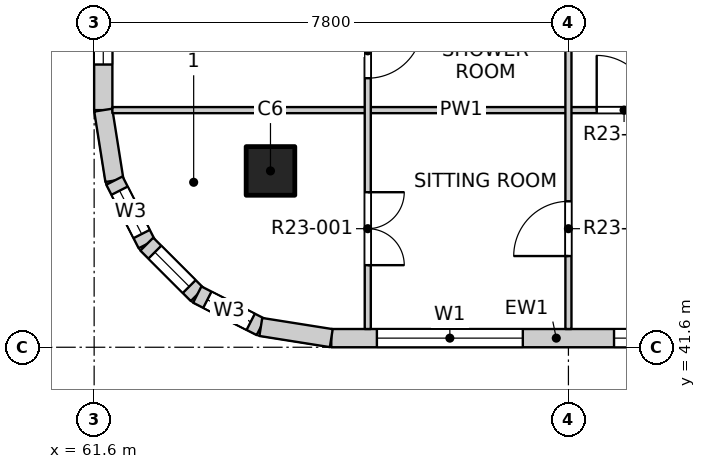
"""IFC4 building model, lengths in metres.
Left out: names, types, materials, properties, quantities, classifications, styles, units other than length and angle.
Written with IfcOpenShell. Run it as: python <this file> out.ifc"""

import sys

from ifc_helpers import new_model, si_unit, direction, frame, frame_2d, origin, origin_2d, place, context, subcontext, project, spatial, rectangle, extrude, element, fill, save


model = new_model("IFC4")
c1 = context("Model", 3, precision=1e-05, world=origin(), true_north=direction((0.0, 1.0)))
c2 = subcontext(c1, "Body", "Model", "MODEL_VIEW")
j1 = project(units=[si_unit("LENGTHUNIT", "METRE"), si_unit("PLANEANGLEUNIT", "RADIAN")], contexts=[c1])
p1 = place(None, origin())
s1 = spatial("IfcSite", under=j1, at=p1, CompositionType="ELEMENT")
p2 = place(p1, origin())
s2 = spatial("IfcBuilding", under=s1, at=p2, CompositionType="ELEMENT")
p3 = place(p2, frame((0.0, 0.0, 238.1)))
s3 = spatial("IfcBuildingStorey", under=s2, at=p3, CompositionType="ELEMENT", Elevation=238.1)
p4 = place(p3, frame((64.5, 44.5, -0.25), z_axis=(0.0, 0.0, 1.0), x_axis=(1.0, 0.0, 0.0)))
e1 = element("IfcColumn", 1, at=p4, inside=s3, PredefinedType="COLUMN", context=c2, shape_type="SweptSolid", body=[
    extrude(rectangle(XDim=0.8, YDim=0.8, at=origin_2d()), origin(), (0.0, 0.0, 1.0), 3.35),
])
p5 = place(p3, frame((65.5, 41.75, 0.0), z_axis=(0.0, 0.0, 1.0), x_axis=(1.0, 0.0, 0.0)))
e2 = element("IfcWall", 2, at=p5, inside=s3, PredefinedType="SOLIDWALL", context=c2, shape_type="SweptSolid", body=[
    extrude(rectangle(XDim=7.4, YDim=0.3, at=frame_2d((3.7, 0.0))), origin(), (0.0, 0.0, 1.0), 3.1),
])
p6 = place(p5, frame((0.75, 0.0, 0.9)))
e3 = element("IfcOpeningElement", 3, at=p6, cuts=e2, PredefinedType="OPENING", context=c2, shape_type="SweptSolid", body=[
    extrude(rectangle(XDim=2.4, YDim=1.8, at=frame_2d((1.2, 0.9))), frame((0.0, 0.16, 0.0), z_axis=(0.0, -1.0, 0.0), x_axis=(1.0, 0.0, 0.0)), (0.0, 0.0, 1.0), 0.32),
])
p7 = place(p5, frame((4.65, 0.0, 0.9)))
e4 = element("IfcOpeningElement", 4, at=p7, cuts=e2, PredefinedType="OPENING", context=c2, shape_type="SweptSolid", body=[
    extrude(rectangle(XDim=2.4, YDim=1.8, at=frame_2d((1.2, 0.9))), frame((0.0, 0.16, 0.0), z_axis=(0.0, -1.0, 0.0), x_axis=(1.0, 0.0, 0.0)), (0.0, 0.0, 1.0), 0.32),
])
p8 = place(p3, frame((61.75, 45.5, 0.0), z_axis=(0.0, 0.0, 1.0), x_axis=(0.0, 1.0, 0.0)))
e5 = element("IfcWall", 5, at=p8, inside=s3, PredefinedType="SOLIDWALL", context=c2, shape_type="SweptSolid", body=[
    extrude(rectangle(XDim=7.4, YDim=0.3, at=frame_2d((3.7, 0.0))), origin(), (0.0, 0.0, 1.0), 3.1),
])
p9 = place(p8, frame((0.75, 0.0, 0.9)))
e6 = element("IfcOpeningElement", 6, at=p9, cuts=e5, PredefinedType="OPENING", context=c2, shape_type="SweptSolid", body=[
    extrude(rectangle(XDim=2.4, YDim=1.8, at=frame_2d((1.2, 0.9))), frame((0.0, 0.16, 0.0), z_axis=(0.0, -1.0, 0.0), x_axis=(1.0, 0.0, 0.0)), (0.0, 0.0, 1.0), 0.32),
])
p10 = place(p8, frame((4.65, 0.0, 0.9)))
e7 = element("IfcOpeningElement", 7, at=p10, cuts=e5, PredefinedType="OPENING", context=c2, shape_type="SweptSolid", body=[
    extrude(rectangle(XDim=2.4, YDim=1.8, at=frame_2d((1.2, 0.9))), frame((0.0, 0.16, 0.0), z_axis=(0.0, -1.0, 0.0), x_axis=(1.0, 0.0, 0.0)), (0.0, 0.0, 1.0), 0.32),
])
p11 = place(p3, frame((61.75, 45.5, 0.0), z_axis=(0.0, 0.0, 1.0), x_axis=(0.156496880861, -0.987678452879, 0.0)))
e8 = element("IfcWall", 8, at=p11, inside=s3, PredefinedType="SOLIDWALL", context=c2, shape_type="SweptSolid", body=[
    extrude(rectangle(XDim=1.173, YDim=0.3, at=frame_2d((0.586, 0.0))), origin(), (0.0, 0.0, 1.0), 3.1),
])
p12 = place(p3, frame((61.934, 44.341, 0.0), z_axis=(0.0, 0.0, 1.0), x_axis=(0.454025524128, -0.890988677504, 0.0)))
e9 = element("IfcWall", 9, at=p12, inside=s3, PredefinedType="SOLIDWALL", context=c2, shape_type="SweptSolid", body=[
    extrude(rectangle(XDim=1.173, YDim=0.3, at=frame_2d((0.587, 0.0))), origin(), (0.0, 0.0, 1.0), 3.1),
])
p13 = place(p12, frame((0.187, 0.0, 0.9)))
e10 = element("IfcOpeningElement", 10, at=p13, cuts=e9, PredefinedType="OPENING", context=c2, shape_type="SweptSolid", body=[
    extrude(rectangle(XDim=0.8, YDim=1.2, at=frame_2d((0.4, 0.6))), frame((0.0, 0.16, 0.0), z_axis=(0.0, -1.0, 0.0), x_axis=(1.0, 0.0, 0.0)), (0.0, 0.0, 1.0), 0.32),
])
p14 = place(p3, frame((62.466, 43.296, 0.0), z_axis=(0.0, 0.0, 1.0), x_axis=(0.707106781187, -0.707106781187, 0.0)))
e11 = element("IfcWall", 11, at=p14, inside=s3, PredefinedType="SOLIDWALL", context=c2, shape_type="SweptSolid", body=[
    extrude(rectangle(XDim=1.173, YDim=0.3, at=frame_2d((0.586, 0.0))), origin(), (0.0, 0.0, 1.0), 3.1),
])
p15 = place(p14, frame((0.187, 0.0, 0.9)))
e12 = element("IfcOpeningElement", 12, at=p15, cuts=e11, PredefinedType="OPENING", context=c2, shape_type="SweptSolid", body=[
    extrude(rectangle(XDim=0.8, YDim=1.2, at=frame_2d((0.4, 0.6))), frame((0.0, 0.16, 0.0), z_axis=(0.0, -1.0, 0.0), x_axis=(1.0, 0.0, 0.0)), (0.0, 0.0, 1.0), 0.32),
])
p16 = place(p3, frame((63.296, 42.466, 0.0), z_axis=(0.0, 0.0, 1.0), x_axis=(0.890988677504, -0.454025524128, 0.0)))
e13 = element("IfcWall", 13, at=p16, inside=s3, PredefinedType="SOLIDWALL", context=c2, shape_type="SweptSolid", body=[
    extrude(rectangle(XDim=1.173, YDim=0.3, at=frame_2d((0.587, 0.0))), origin(), (0.0, 0.0, 1.0), 3.1),
])
p17 = place(p16, frame((0.187, 0.0, 0.9)))
e14 = element("IfcOpeningElement", 14, at=p17, cuts=e13, PredefinedType="OPENING", context=c2, shape_type="SweptSolid", body=[
    extrude(rectangle(XDim=0.8, YDim=1.2, at=frame_2d((0.4, 0.6))), frame((0.0, 0.16, 0.0), z_axis=(0.0, -1.0, 0.0), x_axis=(1.0, 0.0, 0.0)), (0.0, 0.0, 1.0), 0.32),
])
p18 = place(p3, frame((64.341, 41.934, 0.0), z_axis=(0.0, 0.0, 1.0), x_axis=(0.987678452879, -0.156496880861, 0.0)))
e15 = element("IfcWall", 15, at=p18, inside=s3, PredefinedType="SOLIDWALL", context=c2, shape_type="SweptSolid", body=[
    extrude(rectangle(XDim=1.173, YDim=0.3, at=frame_2d((0.586, 0.0))), origin(), (0.0, 0.0, 1.0), 3.1),
])
p19 = place(p3, frame((61.9, 45.5, 0.0), z_axis=(0.0, 0.0, 1.0), x_axis=(1.0, 0.0, 0.0)))
e16 = element("IfcWall", 16, at=p19, inside=s3, PredefinedType="PARTITIONING", context=c2, shape_type="SweptSolid", body=[
    extrude(rectangle(XDim=11.475, YDim=0.1, at=frame_2d((5.737, 0.0))), origin(), (0.0, 0.0, 1.0), 3.1),
])
p20 = place(p19, frame((7.965, 0.0, 0.0)))
e17 = element("IfcOpeningElement", 17, at=p20, cuts=e16, PredefinedType="OPENING", context=c2, shape_type="SweptSolid", body=[
    extrude(rectangle(XDim=0.9, YDim=2.1, at=frame_2d((0.45, 1.05))), frame((0.0, 0.06, 0.0), z_axis=(0.0, -1.0, 0.0), x_axis=(1.0, 0.0, 0.0)), (0.0, 0.0, 1.0), 0.12),
])
p21 = place(p3, frame((66.1, 41.9, 0.0), z_axis=(0.0, 0.0, 1.0), x_axis=(0.0, 1.0, 0.0)))
e18 = element("IfcWall", 18, at=p21, inside=s3, PredefinedType="PARTITIONING", context=c2, shape_type="SweptSolid", body=[
    extrude(rectangle(XDim=19.1, YDim=0.1, at=frame_2d((9.55, 0.0))), origin(), (0.0, 0.0, 1.0), 3.1),
])
p22 = place(p21, frame((1.05, 0.0, 0.0)))
e19 = element("IfcOpeningElement", 19, at=p22, cuts=e18, PredefinedType="OPENING", context=c2, shape_type="SweptSolid", body=[
    extrude(rectangle(XDim=1.2, YDim=2.1, at=frame_2d((0.6, 1.05))), frame((0.0, 0.06, 0.0), z_axis=(0.0, -1.0, 0.0), x_axis=(1.0, 0.0, 0.0)), (0.0, 0.0, 1.0), 0.12),
])
p23 = place(p21, frame((4.125, 0.0, 0.0)))
e20 = element("IfcOpeningElement", 20, at=p23, cuts=e18, PredefinedType="OPENING", context=c2, shape_type="SweptSolid", body=[
    extrude(rectangle(XDim=0.9, YDim=2.1, at=frame_2d((0.45, 1.05))), frame((0.0, 0.06, 0.0), z_axis=(0.0, -1.0, 0.0), x_axis=(1.0, 0.0, 0.0)), (0.0, 0.0, 1.0), 0.12),
])
p24 = place(p21, frame((6.075, 0.0, 0.0)))
e21 = element("IfcOpeningElement", 21, at=p24, cuts=e18, PredefinedType="OPENING", context=c2, shape_type="SweptSolid", body=[
    extrude(rectangle(XDim=0.9, YDim=2.1, at=frame_2d((0.45, 1.05))), frame((0.0, 0.06, 0.0), z_axis=(0.0, -1.0, 0.0), x_axis=(1.0, 0.0, 0.0)), (0.0, 0.0, 1.0), 0.12),
])
p25 = place(p21, frame((8.025, 0.0, 0.0)))
e22 = element("IfcOpeningElement", 22, at=p25, cuts=e18, PredefinedType="OPENING", context=c2, shape_type="SweptSolid", body=[
    extrude(rectangle(XDim=0.9, YDim=2.1, at=frame_2d((0.45, 1.05))), frame((0.0, 0.06, 0.0), z_axis=(0.0, -1.0, 0.0), x_axis=(1.0, 0.0, 0.0)), (0.0, 0.0, 1.0), 0.12),
])
p26 = place(p21, frame((9.975, 0.0, 0.0)))
e23 = element("IfcOpeningElement", 23, at=p26, cuts=e18, PredefinedType="OPENING", context=c2, shape_type="SweptSolid", body=[
    extrude(rectangle(XDim=0.9, YDim=2.1, at=frame_2d((0.45, 1.05))), frame((0.0, 0.06, 0.0), z_axis=(0.0, -1.0, 0.0), x_axis=(1.0, 0.0, 0.0)), (0.0, 0.0, 1.0), 0.12),
])
p27 = place(p21, frame((12.75, 0.0, 0.0)))
e24 = element("IfcOpeningElement", 24, at=p27, cuts=e18, PredefinedType="OPENING", context=c2, shape_type="SweptSolid", body=[
    extrude(rectangle(XDim=1.2, YDim=2.1, at=frame_2d((0.6, 1.05))), frame((0.0, 0.06, 0.0), z_axis=(0.0, -1.0, 0.0), x_axis=(1.0, 0.0, 0.0)), (0.0, 0.0, 1.0), 0.12),
])
p28 = place(p21, frame((15.825, 0.0, 0.0)))
e25 = element("IfcOpeningElement", 25, at=p28, cuts=e18, PredefinedType="OPENING", context=c2, shape_type="SweptSolid", body=[
    extrude(rectangle(XDim=0.9, YDim=2.1, at=frame_2d((0.45, 1.05))), frame((0.0, 0.06, 0.0), z_axis=(0.0, -1.0, 0.0), x_axis=(1.0, 0.0, 0.0)), (0.0, 0.0, 1.0), 0.12),
])
p29 = place(p21, frame((17.775, 0.0, 0.0)))
e26 = element("IfcOpeningElement", 26, at=p29, cuts=e18, PredefinedType="OPENING", context=c2, shape_type="SweptSolid", body=[
    extrude(rectangle(XDim=0.9, YDim=2.1, at=frame_2d((0.45, 1.05))), frame((0.0, 0.06, 0.0), z_axis=(0.0, -1.0, 0.0), x_axis=(1.0, 0.0, 0.0)), (0.0, 0.0, 1.0), 0.12),
])
p30 = place(p3, frame((69.4, 41.9, 0.0), z_axis=(0.0, 0.0, 1.0), x_axis=(0.0, 1.0, 0.0)))
e27 = element("IfcWall", 27, at=p30, inside=s3, PredefinedType="PARTITIONING", context=c2, shape_type="SweptSolid", body=[
    extrude(rectangle(XDim=46.2, YDim=0.1, at=frame_2d((23.1, 0.0))), origin(), (0.0, 0.0, 1.0), 3.1),
])
p31 = place(p30, frame((1.2, 0.0, 0.0)))
e28 = element("IfcOpeningElement", 28, at=p31, cuts=e27, PredefinedType="OPENING", context=c2, shape_type="SweptSolid", body=[
    extrude(rectangle(XDim=0.9, YDim=2.1, at=frame_2d((0.45, 1.05))), frame((0.0, 0.06, 0.0), z_axis=(0.0, -1.0, 0.0), x_axis=(1.0, 0.0, 0.0)), (0.0, 0.0, 1.0), 0.12),
])
p32 = place(p30, frame((6.025, 0.0, 0.0)))
e29 = element("IfcOpeningElement", 29, at=p32, cuts=e27, PredefinedType="OPENING", context=c2, shape_type="SweptSolid", body=[
    extrude(rectangle(XDim=0.9, YDim=2.1, at=frame_2d((0.45, 1.05))), frame((0.0, 0.06, 0.0), z_axis=(0.0, -1.0, 0.0), x_axis=(1.0, 0.0, 0.0)), (0.0, 0.0, 1.0), 0.12),
])
p33 = place(p30, frame((9.975, 0.0, 0.0)))
e30 = element("IfcOpeningElement", 30, at=p33, cuts=e27, PredefinedType="OPENING", context=c2, shape_type="SweptSolid", body=[
    extrude(rectangle(XDim=0.9, YDim=2.1, at=frame_2d((0.45, 1.05))), frame((0.0, 0.06, 0.0), z_axis=(0.0, -1.0, 0.0), x_axis=(1.0, 0.0, 0.0)), (0.0, 0.0, 1.0), 0.12),
])
p34 = place(p30, frame((12.9, 0.0, 0.0)))
e31 = element("IfcOpeningElement", 31, at=p34, cuts=e27, PredefinedType="OPENING", context=c2, shape_type="SweptSolid", body=[
    extrude(rectangle(XDim=0.9, YDim=2.1, at=frame_2d((0.45, 1.05))), frame((0.0, 0.06, 0.0), z_axis=(0.0, -1.0, 0.0), x_axis=(1.0, 0.0, 0.0)), (0.0, 0.0, 1.0), 0.12),
])
p35 = place(p30, frame((17.775, 0.0, 0.0)))
e32 = element("IfcOpeningElement", 32, at=p35, cuts=e27, PredefinedType="OPENING", context=c2, shape_type="SweptSolid", body=[
    extrude(rectangle(XDim=0.9, YDim=2.1, at=frame_2d((0.45, 1.05))), frame((0.0, 0.06, 0.0), z_axis=(0.0, -1.0, 0.0), x_axis=(1.0, 0.0, 0.0)), (0.0, 0.0, 1.0), 0.12),
])
p36 = place(p30, frame((21.625, 0.0, 0.0)))
e33 = element("IfcOpeningElement", 33, at=p36, cuts=e27, PredefinedType="OPENING", context=c2, shape_type="SweptSolid", body=[
    extrude(rectangle(XDim=0.9, YDim=2.1, at=frame_2d((0.45, 1.05))), frame((0.0, 0.06, 0.0), z_axis=(0.0, -1.0, 0.0), x_axis=(1.0, 0.0, 0.0)), (0.0, 0.0, 1.0), 0.12),
])
p37 = place(p30, frame((25.575, 0.0, 0.0)))
e34 = element("IfcOpeningElement", 34, at=p37, cuts=e27, PredefinedType="OPENING", context=c2, shape_type="SweptSolid", body=[
    extrude(rectangle(XDim=0.9, YDim=2.1, at=frame_2d((0.45, 1.05))), frame((0.0, 0.06, 0.0), z_axis=(0.0, -1.0, 0.0), x_axis=(1.0, 0.0, 0.0)), (0.0, 0.0, 1.0), 0.12),
])
p38 = place(p30, frame((28.5, 0.0, 0.0)))
e35 = element("IfcOpeningElement", 35, at=p38, cuts=e27, PredefinedType="OPENING", context=c2, shape_type="SweptSolid", body=[
    extrude(rectangle(XDim=0.9, YDim=2.1, at=frame_2d((0.45, 1.05))), frame((0.0, 0.06, 0.0), z_axis=(0.0, -1.0, 0.0), x_axis=(1.0, 0.0, 0.0)), (0.0, 0.0, 1.0), 0.12),
])
p39 = place(p30, frame((32.4, 0.0, 0.0)))
e36 = element("IfcOpeningElement", 36, at=p39, cuts=e27, PredefinedType="OPENING", context=c2, shape_type="SweptSolid", body=[
    extrude(rectangle(XDim=0.9, YDim=2.1, at=frame_2d((0.45, 1.05))), frame((0.0, 0.06, 0.0), z_axis=(0.0, -1.0, 0.0), x_axis=(1.0, 0.0, 0.0)), (0.0, 0.0, 1.0), 0.12),
])
p40 = place(p30, frame((36.3, 0.0, 0.0)))
e37 = element("IfcOpeningElement", 37, at=p40, cuts=e27, PredefinedType="OPENING", context=c2, shape_type="SweptSolid", body=[
    extrude(rectangle(XDim=0.9, YDim=2.1, at=frame_2d((0.45, 1.05))), frame((0.0, 0.06, 0.0), z_axis=(0.0, -1.0, 0.0), x_axis=(1.0, 0.0, 0.0)), (0.0, 0.0, 1.0), 0.12),
])
p41 = place(p30, frame((40.2, 0.0, 0.0)))
e38 = element("IfcOpeningElement", 38, at=p41, cuts=e27, PredefinedType="OPENING", context=c2, shape_type="SweptSolid", body=[
    extrude(rectangle(XDim=0.9, YDim=2.1, at=frame_2d((0.45, 1.05))), frame((0.0, 0.06, 0.0), z_axis=(0.0, -1.0, 0.0), x_axis=(1.0, 0.0, 0.0)), (0.0, 0.0, 1.0), 0.12),
])
p42 = place(p30, frame((44.1, 0.0, 0.0)))
e39 = element("IfcOpeningElement", 39, at=p42, cuts=e27, PredefinedType="OPENING", context=c2, shape_type="SweptSolid", body=[
    extrude(rectangle(XDim=0.9, YDim=2.1, at=frame_2d((0.45, 1.05))), frame((0.0, 0.06, 0.0), z_axis=(0.0, -1.0, 0.0), x_axis=(1.0, 0.0, 0.0)), (0.0, 0.0, 1.0), 0.12),
])
p43 = place(p6, origin())
e40 = element("IfcWindow", 40, at=p43, inside=s3, PartitioningType="DOUBLE_PANEL_VERTICAL", PredefinedType="WINDOW", context=c2, shape_type="SweptSolid", body=[
    extrude(rectangle(XDim=2.4, YDim=1.8, at=frame_2d((1.2, 0.9))), frame((0.0, 0.03, 0.0), z_axis=(0.0, -1.0, 0.0), x_axis=(1.0, 0.0, 0.0)), (0.0, 0.0, 1.0), 0.06),
])
fill(e3, e40)
p44 = place(p7, origin())
e41 = element("IfcWindow", 41, at=p44, inside=s3, PartitioningType="DOUBLE_PANEL_VERTICAL", PredefinedType="WINDOW", context=c2, shape_type="SweptSolid", body=[
    extrude(rectangle(XDim=2.4, YDim=1.8, at=frame_2d((1.2, 0.9))), frame((0.0, 0.03, 0.0), z_axis=(0.0, -1.0, 0.0), x_axis=(1.0, 0.0, 0.0)), (0.0, 0.0, 1.0), 0.06),
])
fill(e4, e41)
p45 = place(p9, origin())
e42 = element("IfcWindow", 42, at=p45, inside=s3, PartitioningType="DOUBLE_PANEL_VERTICAL", PredefinedType="WINDOW", context=c2, shape_type="SweptSolid", body=[
    extrude(rectangle(XDim=2.4, YDim=1.8, at=frame_2d((1.2, 0.9))), frame((0.0, 0.03, 0.0), z_axis=(0.0, -1.0, 0.0), x_axis=(1.0, 0.0, 0.0)), (0.0, 0.0, 1.0), 0.06),
])
fill(e6, e42)
p46 = place(p13, origin())
e43 = element("IfcWindow", 43, at=p46, inside=s3, PartitioningType="SINGLE_PANEL", PredefinedType="WINDOW", context=c2, shape_type="SweptSolid", body=[
    extrude(rectangle(XDim=0.8, YDim=1.2, at=frame_2d((0.4, 0.6))), frame((0.0, 0.03, 0.0), z_axis=(0.0, -1.0, 0.0), x_axis=(1.0, 0.0, 0.0)), (0.0, 0.0, 1.0), 0.06),
])
fill(e10, e43)
p47 = place(p15, origin())
e44 = element("IfcWindow", 44, at=p47, inside=s3, PartitioningType="SINGLE_PANEL", PredefinedType="WINDOW", context=c2, shape_type="SweptSolid", body=[
    extrude(rectangle(XDim=0.8, YDim=1.2, at=frame_2d((0.4, 0.6))), frame((0.0, 0.03, 0.0), z_axis=(0.0, -1.0, 0.0), x_axis=(1.0, 0.0, 0.0)), (0.0, 0.0, 1.0), 0.06),
])
fill(e12, e44)
p48 = place(p17, origin())
e45 = element("IfcWindow", 45, at=p48, inside=s3, PartitioningType="SINGLE_PANEL", PredefinedType="WINDOW", context=c2, shape_type="SweptSolid", body=[
    extrude(rectangle(XDim=0.8, YDim=1.2, at=frame_2d((0.4, 0.6))), frame((0.0, 0.03, 0.0), z_axis=(0.0, -1.0, 0.0), x_axis=(1.0, 0.0, 0.0)), (0.0, 0.0, 1.0), 0.06),
])
fill(e14, e45)
p49 = place(p22, origin())
e46 = element("IfcDoor", 46, at=p49, inside=s3, OperationType="DOUBLE_DOOR_SINGLE_SWING", PredefinedType="DOOR", context=c2, shape_type="SweptSolid", body=[
    extrude(rectangle(XDim=1.2, YDim=2.1, at=frame_2d((0.6, 1.05))), frame((0.0, 0.025, 0.0), z_axis=(0.0, -1.0, 0.0), x_axis=(1.0, 0.0, 0.0)), (0.0, 0.0, 1.0), 0.05),
])
fill(e19, e46)
p50 = place(p31, origin())
e47 = element("IfcDoor", 47, at=p50, inside=s3, OperationType="SINGLE_SWING_LEFT", PredefinedType="DOOR", context=c2, shape_type="SweptSolid", body=[
    extrude(rectangle(XDim=0.9, YDim=2.1, at=frame_2d((0.45, 1.05))), frame((0.0, 0.025, 0.0), z_axis=(0.0, -1.0, 0.0), x_axis=(1.0, 0.0, 0.0)), (0.0, 0.0, 1.0), 0.05),
])
fill(e28, e47)
p51 = place(p20, origin())
e48 = element("IfcDoor", 48, at=p51, inside=s3, OperationType="SINGLE_SWING_LEFT", PredefinedType="DOOR", context=c2, shape_type="SweptSolid", body=[
    extrude(rectangle(XDim=0.9, YDim=2.1, at=frame_2d((0.45, 1.05))), frame((0.0, 0.025, 0.0), z_axis=(0.0, -1.0, 0.0), x_axis=(1.0, 0.0, 0.0)), (0.0, 0.0, 1.0), 0.05),
])
fill(e17, e48)
p52 = place(p23, origin())
e49 = element("IfcDoor", 49, at=p52, inside=s3, OperationType="SINGLE_SWING_LEFT", PredefinedType="DOOR", context=c2, shape_type="SweptSolid", body=[
    extrude(rectangle(XDim=0.9, YDim=2.1, at=frame_2d((0.45, 1.05))), frame((0.0, 0.025, 0.0), z_axis=(0.0, -1.0, 0.0), x_axis=(1.0, 0.0, 0.0)), (0.0, 0.0, 1.0), 0.05),
])
fill(e20, e49)
save(model, sys.argv[1])
